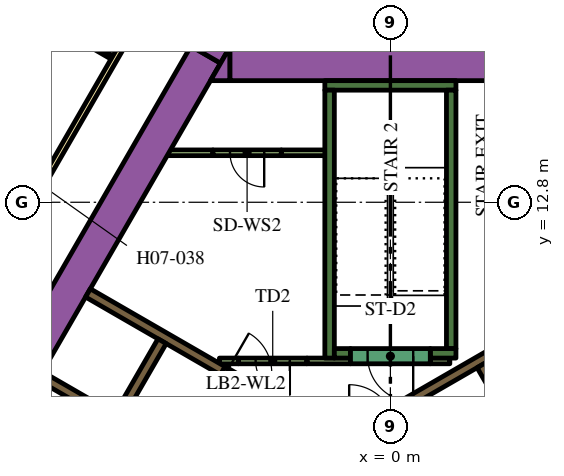
"""IFC4 building model, lengths in metres.
Left out: names, types, materials, properties, quantities, classifications, styles, units other than length and angle.
Written with IfcOpenShell. Run it as: python <this file> out.ifc"""

import sys

from ifc_helpers import new_model, si_unit, direction, frame, frame_2d, origin, place, context, subcontext, project, spatial, polyline, rectangle, outline, extrude, element, fill, save


model = new_model("IFC4")
c1 = context("Model", 3, precision=1e-05, world=origin(), true_north=direction((0.0, 1.0)))
c2 = subcontext(c1, "Body", "Model", "MODEL_VIEW")
j1 = project(units=[si_unit("LENGTHUNIT", "METRE"), si_unit("PLANEANGLEUNIT", "RADIAN")], contexts=[c1])
p1 = place(None, origin())
s1 = spatial("IfcSite", under=j1, at=p1, CompositionType="ELEMENT")
p2 = place(p1, origin())
s2 = spatial("IfcBuilding", under=s1, at=p2, CompositionType="ELEMENT")
p3 = place(p2, frame((0.0, 0.0, 95.4)))
s3 = spatial("IfcBuildingStorey", under=s2, at=p3, CompositionType="ELEMENT", Elevation=95.4)
p4 = place(p3, frame((-15.36, -1.503, 0.0), z_axis=(0.0, 0.0, 1.0), x_axis=(0.50000389221, 0.866023156604, 0.0)))
e1 = element("IfcWall", 1, at=p4, inside=s3, PredefinedType="SOLIDWALL", context=c2, shape_type="SweptSolid", body=[
    extrude(rectangle(XDim=21.0, YDim=0.9, at=frame_2d((10.5, 0.0))), origin(), (0.0, 0.0, 1.0), 3.9),
])
p5 = place(p3, origin())
e2 = element("IfcWall", 2, at=p5, inside=s3, PredefinedType="SOLIDWALL", context=c2, shape_type="SweptSolid", body=[
    extrude(outline(polyline([(-4.215, 16.9), (-4.469, 16.46), (-5.231, 16.9), (-4.215, 16.9)])), origin(), (0.0, 0.0, 1.0), 3.9),
])
p6 = place(p3, frame((-4.224, 16.45, 0.0), z_axis=(0.0, 0.0, 1.0), x_axis=(1.0, 0.0, 0.0)))
e3 = element("IfcWall", 3, at=p6, inside=s3, PredefinedType="SOLIDWALL", context=c2, shape_type="SweptSolid", body=[
    extrude(rectangle(XDim=9.488, YDim=0.9, at=frame_2d((4.744, 0.0))), origin(), (0.0, 0.0, 1.0), 3.9),
])
e4 = element("IfcWall", 4, at=p5, inside=s3, PredefinedType="SOLIDWALL", context=c2, shape_type="SweptSolid", body=[
    extrude(outline(polyline([(-4.734, 16.0), (-4.226, 16.88), (-4.226, 16.0), (-4.734, 16.0)])), origin(), (0.0, 0.0, 1.0), 3.9),
])
p7 = place(p3, frame((-1.725, 15.875, 0.0), z_axis=(0.0, 0.0, 1.0), x_axis=(1.0, 0.0, 0.0)))
e5 = element("IfcWall", 5, at=p7, inside=s3, PredefinedType="SOLIDWALL", context=c2, shape_type="SweptSolid", body=[
    extrude(rectangle(XDim=3.45, YDim=0.25, at=frame_2d((1.725, 0.0))), origin(), (0.0, 0.0, 1.0), 3.9),
])
p8 = place(p3, frame((1.6, 8.95, 0.0), z_axis=(0.0, 0.0, 1.0), x_axis=(0.0, 1.0, 0.0)))
e6 = element("IfcWall", 6, at=p8, inside=s3, PredefinedType="SOLIDWALL", context=c2, shape_type="SweptSolid", body=[
    extrude(rectangle(XDim=6.8, YDim=0.25, at=frame_2d((3.4, 0.0))), origin(), (0.0, 0.0, 1.0), 3.9),
])
p9 = place(p3, frame((1.05, 8.825, 0.0), z_axis=(0.0, 0.0, 1.0), x_axis=(1.0, 0.0, 0.0)))
e7 = element("IfcWall", 7, at=p9, inside=s3, PredefinedType="SOLIDWALL", context=c2, shape_type="SweptSolid", body=[
    extrude(rectangle(XDim=0.675, YDim=0.25, at=frame_2d((0.337, 0.0))), origin(), (0.0, 0.0, 1.0), 3.9),
])
p10 = place(p3, frame((-1.6, 8.7, 0.0), z_axis=(0.0, 0.0, 1.0), x_axis=(0.0, 1.0, 0.0)))
e8 = element("IfcWall", 8, at=p10, inside=s3, PredefinedType="SOLIDWALL", context=c2, shape_type="SweptSolid", body=[
    extrude(rectangle(XDim=7.05, YDim=0.25, at=frame_2d((3.525, 0.0))), origin(), (0.0, 0.0, 1.0), 3.9),
])
p11 = place(p3, frame((-1.475, 8.825, 0.0), z_axis=(0.0, 0.0, 1.0), x_axis=(1.0, 0.0, 0.0)))
e9 = element("IfcWall", 9, at=p11, inside=s3, PredefinedType="SOLIDWALL", context=c2, shape_type="SweptSolid", body=[
    extrude(rectangle(XDim=0.425, YDim=0.25, at=frame_2d((0.212, 0.0))), origin(), (0.0, 0.0, 1.0), 3.9),
])
p12 = place(p3, frame((0.314, 7.456, 0.0), z_axis=(0.0, 0.0, 1.0), x_axis=(0.866013897511, 0.50001992892, 0.0)))
e10 = element("IfcWall", 10, at=p12, inside=s3, PredefinedType="SOLIDWALL", context=c2, shape_type="SweptSolid", body=[
    extrude(rectangle(XDim=3.268, YDim=0.25, at=frame_2d((1.634, 0.0))), origin(), (0.0, 0.0, 1.0), 3.9),
])
e11 = element("IfcWall", 11, at=p5, inside=s3, PredefinedType="SOLIDWALL", context=c2, shape_type="SweptSolid", body=[
    extrude(outline(polyline([(-3.128, 7.481), (-3.259, 7.557), (-3.134, 7.773), (-3.003, 7.698), (-3.128, 7.481)])), origin(), (0.0, 0.0, 1.0), 3.9),
])
p13 = place(p3, frame((-7.314, 7.132, 0.0), z_axis=(0.0, 0.0, 1.0), x_axis=(-0.866008176907, 0.50002983664, 0.0)))
e12 = element("IfcWall", 12, at=p13, inside=s3, PredefinedType="SOLIDWALL", context=c2, shape_type="SweptSolid", body=[
    extrude(rectangle(XDim=2.2, YDim=0.25, at=frame_2d((1.1, 0.0))), origin(), (0.0, 0.0, 1.0), 3.9),
])
p14 = place(p3, frame((-7.959, 10.415, 0.0), z_axis=(0.0, 0.0, 1.0), x_axis=(0.866020958405, -0.500007699544, 0.0)))
e13 = element("IfcWall", 13, at=p14, inside=s3, PredefinedType="SOLIDWALL", context=c2, shape_type="SweptSolid", body=[
    extrude(rectangle(XDim=4.1, YDim=0.25, at=frame_2d((2.05, 0.0))), origin(), (0.0, 0.0, 1.0), 3.9),
])
p15 = place(p3, frame((-3.997, 8.625, 0.0), z_axis=(0.0, 0.0, 1.0), x_axis=(-1.0, 0.0, 0.0)))
e14 = element("IfcWall", 14, at=p15, inside=s3, PredefinedType="PARTITIONING", context=c2, shape_type="SweptSolid", body=[
    extrude(rectangle(XDim=0.502, YDim=0.15, at=frame_2d((0.251, 0.0))), origin(), (0.0, 0.0, 1.0), 2.75),
])
p16 = place(p3, frame((-2.196, 8.625, 0.0), z_axis=(0.0, 0.0, 1.0), x_axis=(1.0, 0.0, 0.0)))
e15 = element("IfcWall", 15, at=p16, inside=s3, PredefinedType="PARTITIONING", context=c2, shape_type="SweptSolid", body=[
    extrude(rectangle(XDim=1.146, YDim=0.15, at=frame_2d((0.573, 0.0))), origin(), (0.0, 0.0, 1.0), 2.75),
])
p17 = place(p3, frame((-5.851, 14.102, 0.0), z_axis=(0.0, 0.0, 1.0), x_axis=(1.0, 0.0, 0.0)))
e16 = element("IfcWall", 16, at=p17, inside=s3, PredefinedType="PARTITIONING", context=c2, shape_type="SweptSolid", body=[
    extrude(rectangle(XDim=1.18, YDim=0.15, at=frame_2d((0.59, 0.0))), origin(), (0.0, 0.0, 1.0), 2.75),
])
p18 = place(p3, frame((-2.871, 14.102, 0.0), z_axis=(0.0, 0.0, 1.0), x_axis=(1.0, 0.0, 0.0)))
e17 = element("IfcWall", 17, at=p18, inside=s3, PredefinedType="PARTITIONING", context=c2, shape_type="SweptSolid", body=[
    extrude(rectangle(XDim=1.196, YDim=0.15, at=frame_2d((0.598, 0.0))), origin(), (0.0, 0.0, 1.0), 2.75),
])
p19 = place(p3, frame((1.05, 8.625, 0.0), z_axis=(0.0, 0.0, 1.0), x_axis=(1.0, 0.0, 0.0)))
e18 = element("IfcWall", 18, at=p19, inside=s3, PredefinedType="PARTITIONING", context=c2, shape_type="SweptSolid", body=[
    extrude(rectangle(XDim=0.514, YDim=0.15, at=frame_2d((0.257, 0.0))), origin(), (0.0, 0.0, 1.0), 2.75),
])
p20 = place(p3, frame((8.565, -2.185, 0.0), z_axis=(0.0, 0.0, 1.0), x_axis=(-0.499997954832, 0.866026584559, 0.0)))
e19 = element("IfcWall", 19, at=p20, inside=s3, PredefinedType="SOLIDWALL", context=c2, shape_type="SweptSolid", body=[
    extrude(rectangle(XDim=12.35, YDim=0.25, at=frame_2d((6.175, 0.0))), origin(), (0.0, 0.0, 1.0), 3.9),
])
p21 = place(p20, frame((5.725, 0.0, 0.0)))
e20 = element("IfcOpeningElement", 20, at=p21, cuts=e19, PredefinedType="OPENING", context=c2, shape_type="SweptSolid", body=[
    extrude(rectangle(XDim=0.9, YDim=2.1, at=frame_2d((0.45, 1.05))), frame((0.0, 0.135, 0.0), z_axis=(0.0, -1.0, 0.0), x_axis=(1.0, 0.0, 0.0)), (0.0, 0.0, 1.0), 0.27),
])
p22 = place(p3, frame((-6.008, 9.144, 0.0), z_axis=(0.0, 0.0, 1.0), x_axis=(-0.500006956611, -0.866021387346, 0.0)))
e21 = element("IfcWall", 21, at=p22, inside=s3, PredefinedType="SOLIDWALL", context=c2, shape_type="SweptSolid", body=[
    extrude(rectangle(XDim=9.83, YDim=0.25, at=frame_2d((4.915, 0.0))), origin(), (0.0, 0.0, 1.0), 3.9),
])
p23 = place(p22, frame((6.985, 0.0, 0.0)))
e22 = element("IfcOpeningElement", 22, at=p23, cuts=e21, PredefinedType="OPENING", context=c2, shape_type="SweptSolid", body=[
    extrude(rectangle(XDim=0.9, YDim=2.1, at=frame_2d((0.45, 1.05))), frame((0.0, 0.135, 0.0), z_axis=(0.0, -1.0, 0.0), x_axis=(1.0, 0.0, 0.0)), (0.0, 0.0, 1.0), 0.27),
])
p24 = place(p3, frame((1.05, 8.75, 0.0), z_axis=(0.0, 0.0, 1.0), x_axis=(-1.0, 0.0, 0.0)))
e23 = element("IfcWall", 23, at=p24, inside=s3, PredefinedType="SOLIDWALL", context=c2, shape_type="SweptSolid", body=[
    extrude(rectangle(XDim=2.1, YDim=0.4, at=frame_2d((1.05, 0.0))), origin(), (0.0, 0.0, 1.0), 3.9),
])
p25 = place(p24, frame((0.45, 0.0, 0.0)))
e24 = element("IfcOpeningElement", 24, at=p25, cuts=e23, PredefinedType="OPENING", context=c2, shape_type="SweptSolid", body=[
    extrude(rectangle(XDim=1.2, YDim=2.1, at=frame_2d((0.6, 1.05))), frame((0.0, 0.21, 0.0), z_axis=(0.0, -1.0, 0.0), x_axis=(1.0, 0.0, 0.0)), (0.0, 0.0, 1.0), 0.42),
])
p26 = place(p3, frame((-2.196, 8.625, 0.0), z_axis=(0.0, 0.0, 1.0), x_axis=(-1.0, 0.0, 0.0)))
e25 = element("IfcWall", 25, at=p26, inside=s3, PredefinedType="PARTITIONING", context=c2, shape_type="SweptSolid", body=[
    extrude(rectangle(XDim=1.8, YDim=0.15, at=frame_2d((0.9, 0.0))), origin(), (0.0, 0.0, 1.0), 2.75),
])
p27 = place(p26, frame((0.45, 0.0, 0.0)))
e26 = element("IfcOpeningElement", 26, at=p27, cuts=e25, PredefinedType="OPENING", context=c2, shape_type="SweptSolid", body=[
    extrude(rectangle(XDim=0.9, YDim=2.1, at=frame_2d((0.45, 1.05))), frame((0.0, 0.085, 0.0), z_axis=(0.0, -1.0, 0.0), x_axis=(1.0, 0.0, 0.0)), (0.0, 0.0, 1.0), 0.17),
])
p28 = place(p3, frame((-4.409, 8.365, 0.0), z_axis=(0.0, 0.0, 1.0), x_axis=(0.866034573852, -0.49998411664, 0.0)))
e27 = element("IfcWall", 27, at=p28, inside=s3, PredefinedType="SOLIDWALL", context=c2, shape_type="SweptSolid", body=[
    extrude(rectangle(XDim=1.4, YDim=0.25, at=frame_2d((0.7, 0.0))), origin(), (0.0, 0.0, 1.0), 3.9),
])
p29 = place(p28, frame((0.1, 0.0, 0.0)))
e28 = element("IfcOpeningElement", 28, at=p29, cuts=e27, PredefinedType="OPENING", context=c2, shape_type="SweptSolid", body=[
    extrude(rectangle(XDim=1.2, YDim=2.1, at=frame_2d((0.6, 1.05))), frame((0.0, 0.135, 0.0), z_axis=(0.0, -1.0, 0.0), x_axis=(1.0, 0.0, 0.0)), (0.0, 0.0, 1.0), 0.27),
])
p30 = place(p3, frame((-2.871, 14.102, 0.0), z_axis=(0.0, 0.0, 1.0), x_axis=(-1.0, 0.0, 0.0)))
e29 = element("IfcWall", 29, at=p30, inside=s3, PredefinedType="PARTITIONING", context=c2, shape_type="SweptSolid", body=[
    extrude(rectangle(XDim=1.8, YDim=0.15, at=frame_2d((0.9, 0.0))), origin(), (0.0, 0.0, 1.0), 2.75),
])
p31 = place(p30, frame((0.45, 0.0, 0.0)))
e30 = element("IfcOpeningElement", 30, at=p31, cuts=e29, PredefinedType="OPENING", context=c2, shape_type="SweptSolid", body=[
    extrude(rectangle(XDim=0.9, YDim=2.1, at=frame_2d((0.45, 1.05))), frame((0.0, 0.085, 0.0), z_axis=(0.0, -1.0, 0.0), x_axis=(1.0, 0.0, 0.0)), (0.0, 0.0, 1.0), 0.17),
])
p32 = place(p3, frame((-19.081, -3.9, 0.0), z_axis=(0.0, 0.0, 1.0), x_axis=(0.499998313975, 0.866026377209, 0.0)))
e31 = element("IfcWall", 31, at=p32, inside=s3, PredefinedType="PARTITIONING", context=c2, shape_type="SweptSolid", body=[
    extrude(rectangle(XDim=25.766, YDim=0.15, at=frame_2d((12.883, 0.0))), origin(), (0.0, 0.0, 1.0), 2.75),
])
p33 = place(p32, frame((19.306, 0.0, 0.0)))
e32 = element("IfcOpeningElement", 32, at=p33, cuts=e31, PredefinedType="OPENING", context=c2, shape_type="SweptSolid", body=[
    extrude(rectangle(XDim=1.0, YDim=2.1, at=frame_2d((0.5, 1.05))), frame((0.0, 0.085, 0.0), z_axis=(0.0, -1.0, 0.0), x_axis=(1.0, 0.0, 0.0)), (0.0, 0.0, 1.0), 0.17),
])
p34 = place(p32, frame((17.144, 0.0, 0.0)))
e33 = element("IfcOpeningElement", 33, at=p34, cuts=e31, PredefinedType="OPENING", context=c2, shape_type="SweptSolid", body=[
    extrude(rectangle(XDim=0.9, YDim=2.1, at=frame_2d((0.45, 1.05))), frame((0.0, 0.085, 0.0), z_axis=(0.0, -1.0, 0.0), x_axis=(1.0, 0.0, 0.0)), (0.0, 0.0, 1.0), 0.17),
])
p35 = place(p32, frame((9.955, 0.0, 0.0)))
e34 = element("IfcOpeningElement", 34, at=p35, cuts=e31, PredefinedType="OPENING", context=c2, shape_type="SweptSolid", body=[
    extrude(rectangle(XDim=1.1, YDim=2.1, at=frame_2d((0.55, 1.05))), frame((0.0, 0.085, 0.0), z_axis=(0.0, -1.0, 0.0), x_axis=(1.0, 0.0, 0.0)), (0.0, 0.0, 1.0), 0.17),
])
p36 = place(p32, frame((8.648, 0.0, 0.0)))
e35 = element("IfcOpeningElement", 35, at=p36, cuts=e31, PredefinedType="OPENING", context=c2, shape_type="SweptSolid", body=[
    extrude(rectangle(XDim=1.0, YDim=2.1, at=frame_2d((0.5, 1.05))), frame((0.0, 0.085, 0.0), z_axis=(0.0, -1.0, 0.0), x_axis=(1.0, 0.0, 0.0)), (0.0, 0.0, 1.0), 0.17),
])
p37 = place(p32, frame((1.553, 0.0, 0.0)))
e36 = element("IfcOpeningElement", 36, at=p37, cuts=e31, PredefinedType="OPENING", context=c2, shape_type="SweptSolid", body=[
    extrude(rectangle(XDim=0.9, YDim=2.1, at=frame_2d((0.45, 1.05))), frame((0.0, 0.085, 0.0), z_axis=(0.0, -1.0, 0.0), x_axis=(1.0, 0.0, 0.0)), (0.0, 0.0, 1.0), 0.17),
])
p38 = place(p3, frame((-9.578, 17.911, 0.0), z_axis=(0.0, 0.0, 1.0), x_axis=(0.866021400173, -0.500006934395, 0.0)))
e37 = element("IfcWall", 37, at=p38, inside=s3, PredefinedType="PARTITIONING", context=c2, shape_type="SweptSolid", body=[
    extrude(rectangle(XDim=2.6, YDim=0.1, at=frame_2d((1.3, 0.0))), origin(), (0.0, 0.0, 1.0), 2.75),
])
p39 = place(p38, frame((1.1, 0.0, 0.0)))
e38 = element("IfcOpeningElement", 38, at=p39, cuts=e37, PredefinedType="OPENING", context=c2, shape_type="SweptSolid", body=[
    extrude(rectangle(XDim=0.9, YDim=2.1, at=frame_2d((0.45, 1.05))), frame((0.0, 0.06, 0.0), z_axis=(0.0, -1.0, 0.0), x_axis=(1.0, 0.0, 0.0)), (0.0, 0.0, 1.0), 0.12),
])
p40 = place(p25, origin())
e39 = element("IfcDoor", 39, at=p40, inside=s3, OperationType="SINGLE_SWING_LEFT", PredefinedType="DOOR", context=c2, shape_type="SweptSolid", body=[
    extrude(rectangle(XDim=1.2, YDim=2.1, at=frame_2d((0.6, 1.05))), frame((0.0, 0.025, 0.0), z_axis=(0.0, -1.0, 0.0), x_axis=(1.0, 0.0, 0.0)), (0.0, 0.0, 1.0), 0.05),
])
fill(e24, e39)
p41 = place(p27, origin())
e40 = element("IfcDoor", 40, at=p41, inside=s3, OperationType="SINGLE_SWING_LEFT", PredefinedType="DOOR", context=c2, shape_type="SweptSolid", body=[
    extrude(rectangle(XDim=0.9, YDim=2.1, at=frame_2d((0.45, 1.05))), frame((0.0, 0.025, 0.0), z_axis=(0.0, -1.0, 0.0), x_axis=(1.0, 0.0, 0.0)), (0.0, 0.0, 1.0), 0.05),
])
fill(e26, e40)
p42 = place(p29, origin())
e41 = element("IfcDoor", 41, at=p42, inside=s3, OperationType="SINGLE_SWING_LEFT", PredefinedType="DOOR", context=c2, shape_type="SweptSolid", body=[
    extrude(rectangle(XDim=1.2, YDim=2.1, at=frame_2d((0.6, 1.05))), frame((0.0, 0.025, 0.0), z_axis=(0.0, -1.0, 0.0), x_axis=(1.0, 0.0, 0.0)), (0.0, 0.0, 1.0), 0.05),
])
fill(e28, e41)
p43 = place(p31, origin())
e42 = element("IfcDoor", 42, at=p43, inside=s3, OperationType="SINGLE_SWING_LEFT", PredefinedType="DOOR", context=c2, shape_type="SweptSolid", body=[
    extrude(rectangle(XDim=0.9, YDim=2.1, at=frame_2d((0.45, 1.05))), frame((0.0, 0.025, 0.0), z_axis=(0.0, -1.0, 0.0), x_axis=(1.0, 0.0, 0.0)), (0.0, 0.0, 1.0), 0.05),
])
fill(e30, e42)
save(model, sys.argv[1])
